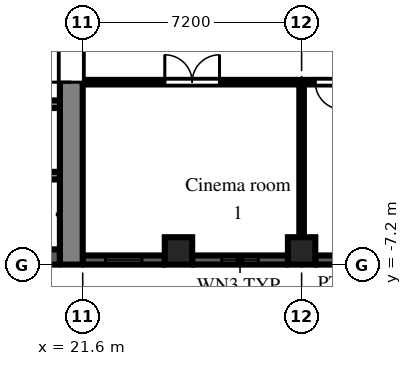
"""IFC4 building model, lengths in metres.
Left out: names, types, materials, properties, quantities, classifications, styles, units other than length and angle.
Written with IfcOpenShell. Run it as: python <this file> out.ifc"""

import sys

from ifc_helpers import new_model, si_unit, direction, frame, frame_2d, origin, origin_2d, place, context, subcontext, project, spatial, rectangle, extrude, element, fill, save


model = new_model("IFC4")
c1 = context("Model", 3, precision=1e-05, world=origin(), true_north=direction((0.0, 1.0)))
c2 = subcontext(c1, "Body", "Model", "MODEL_VIEW")
j1 = project(units=[si_unit("LENGTHUNIT", "METRE"), si_unit("PLANEANGLEUNIT", "RADIAN")], contexts=[c1])
p1 = place(None, origin())
s1 = spatial("IfcSite", under=j1, at=p1, CompositionType="ELEMENT")
p2 = place(p1, origin())
s2 = spatial("IfcBuilding", under=s1, at=p2, CompositionType="ELEMENT")
p3 = place(p2, frame((0.0, 0.0, 11.7)))
s3 = spatial("IfcBuildingStorey", under=s2, at=p3, CompositionType="ELEMENT", Elevation=11.7)
for number, where, z_axis, x_axis in (
    (1, (24.75, -6.75, 0.0), (0.0, 0.0, 1.0), (1.0, 0.0, 0.0)),
    (2, (28.8, -6.75, 0.0), (0.0, 0.0, 1.0), (1.0, 0.0, 0.0)),
):
    element("IfcColumn", number, at=place(p3, frame(where, z_axis=z_axis, x_axis=x_axis)), inside=s3, PredefinedType="COLUMN", context=c2, shape_type="SweptSolid", body=[
        extrude(rectangle(XDim=0.9, YDim=0.9, at=origin_2d()), origin(), (0.0, 0.0, 1.0), 3.0),
    ])
p4 = place(p3, frame((21.6, -7.05, 0.0), z_axis=(0.0, 0.0, 1.0), x_axis=(1.0, 0.0, 0.0)))
e3 = element("IfcWall", 3, at=p4, inside=s3, PredefinedType="SOLIDWALL", context=c2, shape_type="SweptSolid", body=[
    extrude(rectangle(XDim=2.7, YDim=0.3, at=frame_2d((1.35, 0.0))), origin(), (0.0, 0.0, 1.0), 2.1),
])
p5 = place(p4, frame((0.75, 0.0, 0.2)))
e4 = element("IfcOpeningElement", 4, at=p5, cuts=e3, PredefinedType="OPENING", context=c2, shape_type="SweptSolid", body=[
    extrude(rectangle(XDim=1.2, YDim=1.85, at=frame_2d((0.6, 0.925))), frame((0.0, 0.16, 0.0), z_axis=(0.0, -1.0, 0.0), x_axis=(1.0, 0.0, 0.0)), (0.0, 0.0, 1.0), 0.32),
])
p6 = place(p3, frame((25.2, -7.05, 0.0), z_axis=(0.0, 0.0, 1.0), x_axis=(1.0, 0.0, 0.0)))
e5 = element("IfcWall", 5, at=p6, inside=s3, PredefinedType="SOLIDWALL", context=c2, shape_type="SweptSolid", body=[
    extrude(rectangle(XDim=3.15, YDim=0.3, at=frame_2d((1.575, 0.0))), origin(), (0.0, 0.0, 1.0), 2.1),
])
p7 = place(p6, frame((0.975, 0.0, 0.2)))
e6 = element("IfcOpeningElement", 6, at=p7, cuts=e5, PredefinedType="OPENING", context=c2, shape_type="SweptSolid", body=[
    extrude(rectangle(XDim=1.2, YDim=1.85, at=frame_2d((0.6, 0.925))), frame((0.0, 0.16, 0.0), z_axis=(0.0, -1.0, 0.0), x_axis=(1.0, 0.0, 0.0)), (0.0, 0.0, 1.0), 0.32),
])
p8 = place(p3, frame((29.25, -7.05, 0.0), z_axis=(0.0, 0.0, 1.0), x_axis=(1.0, 0.0, 0.0)))
e7 = element("IfcWall", 7, at=p8, inside=s3, PredefinedType="SOLIDWALL", context=c2, shape_type="SweptSolid", body=[
    extrude(rectangle(XDim=6.3, YDim=0.3, at=frame_2d((3.15, 0.0))), origin(), (0.0, 0.0, 1.0), 2.1),
])
p9 = place(p3, frame((21.225, -7.2, 0.0), z_axis=(0.0, 0.0, 1.0), x_axis=(0.0, 1.0, 0.0)))
e8 = element("IfcWall", 8, at=p9, inside=s3, PredefinedType="SHEAR", context=c2, shape_type="SweptSolid", body=[
    extrude(rectangle(XDim=14.4, YDim=0.75, at=frame_2d((7.2, 0.0))), origin(), (0.0, 0.0, 1.0), 2.575),
])
p10 = place(p9, frame((6.0, 0.0, 0.0)))
e9 = element("IfcOpeningElement", 9, at=p10, cuts=e8, PredefinedType="OPENING", context=c2, shape_type="SweptSolid", body=[
    extrude(rectangle(XDim=2.4, YDim=2.2, at=frame_2d((1.2, 1.1))), frame((0.0, 0.385, 0.0), z_axis=(0.0, -1.0, 0.0), x_axis=(1.0, 0.0, 0.0)), (0.0, 0.0, 1.0), 0.77),
])
p11 = place(p3, frame((7.9, -6.95, 0.0), z_axis=(0.0, 0.0, 1.0), x_axis=(1.0, 0.0, 0.0)))
e10 = element("IfcWall", 10, at=p11, inside=s3, PredefinedType="SHEAR", context=c2, shape_type="SweptSolid", body=[
    extrude(rectangle(XDim=12.95, YDim=0.5, at=frame_2d((6.475, 0.0))), origin(), (0.0, 0.0, 1.0), 2.575),
])
p12 = place(p3, frame((7.9, -1.925, 0.0), z_axis=(0.0, 0.0, 1.0), x_axis=(1.0, 0.0, 0.0)))
e11 = element("IfcWall", 11, at=p12, inside=s3, PredefinedType="SHEAR", context=c2, shape_type="SweptSolid", body=[
    extrude(rectangle(XDim=12.95, YDim=0.25, at=frame_2d((6.475, 0.0))), origin(), (0.0, 0.0, 1.0), 2.575),
])
p13 = place(p12, frame((4.825, 0.0, 0.0)))
e12 = element("IfcOpeningElement", 12, at=p13, cuts=e11, PredefinedType="OPENING", context=c2, shape_type="SweptSolid", body=[
    extrude(rectangle(XDim=1.1, YDim=2.1, at=frame_2d((0.55, 1.05))), frame((0.0, 0.135, 0.0), z_axis=(0.0, -1.0, 0.0), x_axis=(1.0, 0.0, 0.0)), (0.0, 0.0, 1.0), 0.27),
])
p14 = place(p12, frame((7.025, 0.0, 0.0)))
e13 = element("IfcOpeningElement", 13, at=p14, cuts=e11, PredefinedType="OPENING", context=c2, shape_type="SweptSolid", body=[
    extrude(rectangle(XDim=1.1, YDim=2.1, at=frame_2d((0.55, 1.05))), frame((0.0, 0.135, 0.0), z_axis=(0.0, -1.0, 0.0), x_axis=(1.0, 0.0, 0.0)), (0.0, 0.0, 1.0), 0.27),
])
p15 = place(p12, frame((9.225, 0.0, 0.0)))
e14 = element("IfcOpeningElement", 14, at=p15, cuts=e11, PredefinedType="OPENING", context=c2, shape_type="SweptSolid", body=[
    extrude(rectangle(XDim=1.1, YDim=2.1, at=frame_2d((0.55, 1.05))), frame((0.0, 0.135, 0.0), z_axis=(0.0, -1.0, 0.0), x_axis=(1.0, 0.0, 0.0)), (0.0, 0.0, 1.0), 0.27),
])
p16 = place(p12, frame((0.525, 0.0, 0.0)))
e15 = element("IfcOpeningElement", 15, at=p16, cuts=e11, PredefinedType="OPENING", context=c2, shape_type="SweptSolid", body=[
    extrude(rectangle(XDim=0.9, YDim=2.1, at=frame_2d((0.45, 1.05))), frame((0.0, 0.135, 0.0), z_axis=(0.0, -1.0, 0.0), x_axis=(1.0, 0.0, 0.0)), (0.0, 0.0, 1.0), 0.27),
])
p17 = place(p12, frame((2.625, 0.0, 0.0)))
e16 = element("IfcOpeningElement", 16, at=p17, cuts=e11, PredefinedType="OPENING", context=c2, shape_type="SweptSolid", body=[
    extrude(rectangle(XDim=1.1, YDim=2.1, at=frame_2d((0.55, 1.05))), frame((0.0, 0.135, 0.0), z_axis=(0.0, -1.0, 0.0), x_axis=(1.0, 0.0, 0.0)), (0.0, 0.0, 1.0), 0.27),
])
p18 = place(p3, frame((12.3, -4.275, 0.0), z_axis=(0.0, 0.0, 1.0), x_axis=(1.0, 0.0, 0.0)))
e17 = element("IfcWall", 17, at=p18, inside=s3, PredefinedType="SHEAR", context=c2, shape_type="SweptSolid", body=[
    extrude(rectangle(XDim=8.55, YDim=0.25, at=frame_2d((4.275, 0.0))), origin(), (0.0, 0.0, 1.0), 2.575),
])
p19 = place(p3, frame((21.6, -1.2, 0.0), z_axis=(0.0, 0.0, 1.0), x_axis=(1.0, 0.0, 0.0)))
e18 = element("IfcWall", 18, at=p19, inside=s3, PredefinedType="PARTITIONING", context=c2, shape_type="SweptSolid", body=[
    extrude(rectangle(XDim=14.9, YDim=0.15, at=frame_2d((7.45, 0.0))), origin(), (0.0, 0.0, 1.0), 2.575),
])
p20 = place(p19, frame((2.7, 0.0, 0.0)))
e19 = element("IfcOpeningElement", 19, at=p20, cuts=e18, PredefinedType="OPENING", context=c2, shape_type="SweptSolid", body=[
    extrude(rectangle(XDim=1.8, YDim=2.1, at=frame_2d((0.9, 1.05))), frame((0.0, 0.085, 0.0), z_axis=(0.0, -1.0, 0.0), x_axis=(1.0, 0.0, 0.0)), (0.0, 0.0, 1.0), 0.17),
])
p21 = place(p19, frame((7.65, 0.0, 0.0)))
e20 = element("IfcOpeningElement", 20, at=p21, cuts=e18, PredefinedType="OPENING", context=c2, shape_type="SweptSolid", body=[
    extrude(rectangle(XDim=0.9, YDim=2.1, at=frame_2d((0.45, 1.05))), frame((0.0, 0.085, 0.0), z_axis=(0.0, -1.0, 0.0), x_axis=(1.0, 0.0, 0.0)), (0.0, 0.0, 1.0), 0.17),
])
p22 = place(p19, frame((9.45, 0.0, 0.0)))
e21 = element("IfcOpeningElement", 21, at=p22, cuts=e18, PredefinedType="OPENING", context=c2, shape_type="SweptSolid", body=[
    extrude(rectangle(XDim=0.9, YDim=2.1, at=frame_2d((0.45, 1.05))), frame((0.0, 0.085, 0.0), z_axis=(0.0, -1.0, 0.0), x_axis=(1.0, 0.0, 0.0)), (0.0, 0.0, 1.0), 0.17),
])
p23 = place(p19, frame((11.95, 0.0, 0.0)))
e22 = element("IfcOpeningElement", 22, at=p23, cuts=e18, PredefinedType="OPENING", context=c2, shape_type="SweptSolid", body=[
    extrude(rectangle(XDim=1.8, YDim=2.1, at=frame_2d((0.9, 1.05))), frame((0.0, 0.085, 0.0), z_axis=(0.0, -1.0, 0.0), x_axis=(1.0, 0.0, 0.0)), (0.0, 0.0, 1.0), 0.17),
])
p24 = place(p3, frame((28.8, -6.9, 0.0), z_axis=(0.0, 0.0, 1.0), x_axis=(0.0, 1.0, 0.0)))
e23 = element("IfcWall", 23, at=p24, inside=s3, PredefinedType="PARTITIONING", context=c2, shape_type="SweptSolid", body=[
    extrude(rectangle(XDim=5.625, YDim=0.15, at=frame_2d((2.812, 0.0))), origin(), (0.0, 0.0, 1.0), 2.575),
])
p25 = place(p5, origin())
e24 = element("IfcWindow", 24, at=p25, inside=s3, PartitioningType="SINGLE_PANEL", PredefinedType="WINDOW", context=c2, shape_type="SweptSolid", body=[
    extrude(rectangle(XDim=1.2, YDim=1.85, at=frame_2d((0.6, 0.925))), frame((0.0, 0.03, 0.0), z_axis=(0.0, -1.0, 0.0), x_axis=(1.0, 0.0, 0.0)), (0.0, 0.0, 1.0), 0.06),
])
fill(e4, e24)
p26 = place(p7, origin())
e25 = element("IfcWindow", 25, at=p26, inside=s3, PartitioningType="SINGLE_PANEL", PredefinedType="WINDOW", context=c2, shape_type="SweptSolid", body=[
    extrude(rectangle(XDim=1.2, YDim=1.85, at=frame_2d((0.6, 0.925))), frame((0.0, 0.03, 0.0), z_axis=(0.0, -1.0, 0.0), x_axis=(1.0, 0.0, 0.0)), (0.0, 0.0, 1.0), 0.06),
])
fill(e6, e25)
p27 = place(p10, origin())
e26 = element("IfcDoor", 26, at=p27, inside=s3, OperationType="DOUBLE_DOOR_DOUBLE_SWING", PredefinedType="DOOR", context=c2, shape_type="SweptSolid", body=[
    extrude(rectangle(XDim=2.4, YDim=2.2, at=frame_2d((1.2, 1.1))), frame((0.0, 0.025, 0.0), z_axis=(0.0, -1.0, 0.0), x_axis=(1.0, 0.0, 0.0)), (0.0, 0.0, 1.0), 0.05),
])
fill(e9, e26)
p28 = place(p20, origin())
e27 = element("IfcDoor", 27, at=p28, inside=s3, OperationType="DOUBLE_DOOR_DOUBLE_SWING", PredefinedType="DOOR", context=c2, shape_type="SweptSolid", body=[
    extrude(rectangle(XDim=1.8, YDim=2.1, at=frame_2d((0.9, 1.05))), frame((0.0, 0.025, 0.0), z_axis=(0.0, -1.0, 0.0), x_axis=(1.0, 0.0, 0.0)), (0.0, 0.0, 1.0), 0.05),
])
fill(e19, e27)
p29 = place(p21, frame((0.9, 0.0, 0.0), z_axis=(0.0, 0.0, 1.0), x_axis=(-1.0, 0.0, 0.0)))
e28 = element("IfcDoor", 28, at=p29, inside=s3, OperationType="SINGLE_SWING_LEFT", PredefinedType="DOOR", context=c2, shape_type="SweptSolid", body=[
    extrude(rectangle(XDim=0.9, YDim=2.1, at=frame_2d((0.45, 1.05))), frame((0.0, 0.025, 0.0), z_axis=(0.0, -1.0, 0.0), x_axis=(1.0, 0.0, 0.0)), (0.0, 0.0, 1.0), 0.05),
])
fill(e20, e28)
save(model, sys.argv[1])
